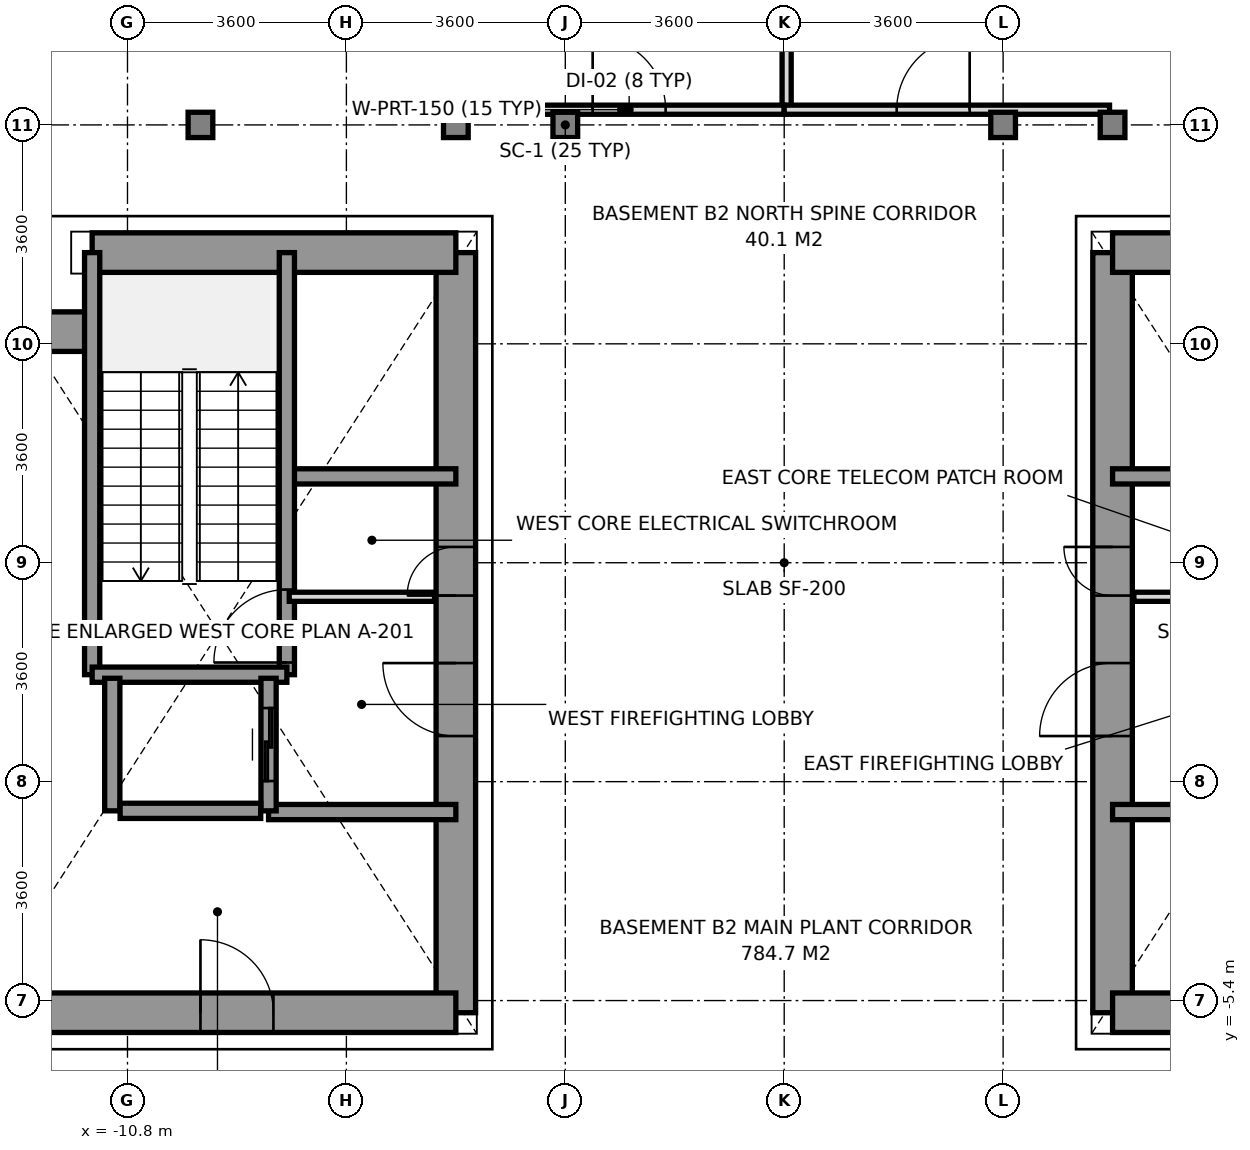
"""IFC4 building model, lengths in metres.
Left out: names, types, materials, properties, quantities, classifications, styles, units other than length and angle.
Written with IfcOpenShell. Run it as: python <this file> out.ifc"""

import sys

from ifc_helpers import new_model, si_unit, direction, frame, frame_2d, origin, origin_2d, place, context, subcontext, project, spatial, rectangle, i_section, extrude, source, transform, mapped, element, fill, save


model = new_model("IFC4")
c1 = context("Model", 3, precision=1e-05, world=origin(), true_north=direction((0.0, 1.0)))
c2 = subcontext(c1, "Body", "Model", "MODEL_VIEW")
j1 = project(units=[si_unit("LENGTHUNIT", "METRE"), si_unit("PLANEANGLEUNIT", "RADIAN")], contexts=[c1])
p1 = place(None, origin())
s1 = spatial("IfcSite", under=j1, at=p1, CompositionType="ELEMENT")
p2 = place(p1, origin())
s2 = spatial("IfcBuilding", under=s1, at=p2, CompositionType="ELEMENT")
p3 = place(p2, frame((0.0, 0.0, -8.4)))
s3 = spatial("IfcBuildingStorey", under=s2, at=p3, CompositionType="ELEMENT", Elevation=-8.4)
m1 = source(origin(), c2, "Body", "SweptSolid", [
    extrude(i_section(OverallWidth=0.406, OverallDepth=0.416, WebThickness=0.024, FlangeThickness=0.039, at=origin_2d()), origin(), (0.0, 0.0, 1.0), 4.12),
])
for number, where, z_axis, x_axis in (
    (1, (-9.6, 9.0, -0.2), (0.0, 0.0, 1.0), (1.0, 0.0, 0.0)),
    (2, (-5.4, 9.0, -0.2), (0.0, 0.0, 1.0), (1.0, 0.0, 0.0)),
    (3, (-3.6, 9.0, -0.2), (0.0, 0.0, 1.0), (1.0, 0.0, 0.0)),
    (4, (3.6, 9.0, -0.2), (0.0, 0.0, 1.0), (1.0, 0.0, 0.0)),
    (5, (5.4, 9.0, -0.2), (0.0, 0.0, 1.0), (1.0, 0.0, 0.0)),
):
    element("IfcColumn", number, at=place(p3, frame(where, z_axis=z_axis, x_axis=x_axis)), inside=s3, PredefinedType="COLUMN", context=c2, shape_type="MappedRepresentation", body=[
        mapped(m1, transform((0.0, 0.0, 0.0), x_axis=(1.0, 0.0, 0.0), y_axis=(0.0, 1.0, 0.0), z_axis=(0.0, 0.0, 1.0), scale=1.0)),
    ])
p4 = place(p3, frame((-5.4, -5.6, -0.2), z_axis=(0.0, 0.0, 1.0), x_axis=(0.0, 1.0, 0.0)))
e6 = element("IfcWall", 6, at=p4, inside=s3, PredefinedType="SHEAR", context=c2, shape_type="SweptSolid", body=[
    extrude(rectangle(XDim=12.5, YDim=0.65, at=frame_2d((6.25, 0.0))), origin(), (0.0, 0.0, 1.0), 4.12),
])
p5 = place(p4, frame((4.55, 0.0, 0.2)))
e7 = element("IfcOpeningElement", 7, at=p5, cuts=e6, PredefinedType="OPENING", context=c2, shape_type="SweptSolid", body=[
    extrude(rectangle(XDim=1.2, YDim=2.2, at=frame_2d((0.6, 1.1))), frame((0.0, 0.335, 0.0), z_axis=(0.0, -1.0, 0.0), x_axis=(1.0, 0.0, 0.0)), (0.0, 0.0, 1.0), 0.67),
])
p6 = place(p4, frame((6.86, 0.0, 0.2)))
e8 = element("IfcOpeningElement", 8, at=p6, cuts=e6, PredefinedType="OPENING", context=c2, shape_type="SweptSolid", body=[
    extrude(rectangle(XDim=0.8, YDim=2.1, at=frame_2d((0.4, 1.05))), frame((0.0, 0.335, 0.0), z_axis=(0.0, -1.0, 0.0), x_axis=(1.0, 0.0, 0.0)), (0.0, 0.0, 1.0), 0.67),
])
p7 = place(p3, frame((-11.381, 6.9, -0.2), z_axis=(0.0, 0.0, 1.0), x_axis=(1.0, 0.0, 0.0)))
e9 = element("IfcWall", 9, at=p7, inside=s3, PredefinedType="SHEAR", context=c2, shape_type="SweptSolid", body=[
    extrude(rectangle(XDim=5.981, YDim=0.65, at=frame_2d((2.991, 0.0))), origin(), (0.0, 0.0, 1.0), 4.12),
])
p8 = place(p3, frame((-13.2, 5.6, -0.2), z_axis=(0.0, 0.0, 1.0), x_axis=(1.0, 0.0, 0.0)))
e10 = element("IfcWall", 10, at=p8, inside=s3, PredefinedType="SHEAR", context=c2, shape_type="SweptSolid", body=[
    extrude(rectangle(XDim=1.819, YDim=0.65, at=frame_2d((0.909, 0.0))), origin(), (0.0, 0.0, 1.0), 4.12),
])
p9 = place(p3, frame((-13.2, -5.6, -0.2), z_axis=(0.0, 0.0, 1.0), x_axis=(1.0, 0.0, 0.0)))
e11 = element("IfcWall", 11, at=p9, inside=s3, PredefinedType="SHEAR", context=c2, shape_type="SweptSolid", body=[
    extrude(rectangle(XDim=7.8, YDim=0.65, at=frame_2d((3.9, 0.0))), origin(), (0.0, 0.0, 1.0), 4.12),
])
p10 = place(p9, frame((3.6, 0.0, 0.2)))
e12 = element("IfcOpeningElement", 12, at=p10, cuts=e11, PredefinedType="OPENING", context=c2, shape_type="SweptSolid", body=[
    extrude(rectangle(XDim=1.2, YDim=2.2, at=frame_2d((0.6, 1.1))), frame((0.0, 0.335, 0.0), z_axis=(0.0, -1.0, 0.0), x_axis=(1.0, 0.0, 0.0)), (0.0, 0.0, 1.0), 0.67),
])
p11 = place(p3, frame((-8.18, 3.22, -0.2), z_axis=(0.0, 0.0, 1.0), x_axis=(1.0, 0.0, 0.0)))
e13 = element("IfcWall", 13, at=p11, inside=s3, PredefinedType="SOLIDWALL", context=c2, shape_type="SweptSolid", body=[
    extrude(rectangle(XDim=2.78, YDim=0.25, at=frame_2d((1.39, 0.0))), origin(), (0.0, 0.0, 1.0), 4.12),
])
p12 = place(p3, frame((-8.48, -2.3, -0.2), z_axis=(0.0, 0.0, 1.0), x_axis=(1.0, 0.0, 0.0)))
e14 = element("IfcWall", 14, at=p12, inside=s3, PredefinedType="SOLIDWALL", context=c2, shape_type="SweptSolid", body=[
    extrude(rectangle(XDim=3.08, YDim=0.25, at=frame_2d((1.54, 0.0))), origin(), (0.0, 0.0, 1.0), 4.12),
])
p13 = place(p3, frame((-8.179, -0.041, -0.2), z_axis=(0.0, 0.0, 1.0), x_axis=(0.0, 1.0, 0.0)))
e15 = element("IfcWall", 15, at=p13, inside=s3, PredefinedType="SOLIDWALL", context=c2, shape_type="SweptSolid", body=[
    extrude(rectangle(XDim=6.941, YDim=0.25, at=frame_2d((3.47, 0.0))), origin(), (0.0, 0.0, 1.0), 4.12),
])
p14 = place(p13, frame((0.2, 0.0, 0.2)))
e16 = element("IfcOpeningElement", 16, at=p14, cuts=e15, PredefinedType="OPENING", context=c2, shape_type="SweptSolid", body=[
    extrude(rectangle(XDim=1.2, YDim=2.2, at=frame_2d((0.6, 1.1))), frame((0.0, 0.135, 0.0), z_axis=(0.0, -1.0, 0.0), x_axis=(1.0, 0.0, 0.0)), (0.0, 0.0, 1.0), 0.27),
])
p15 = place(p3, frame((-11.381, -0.041, -0.2), z_axis=(0.0, 0.0, 1.0), x_axis=(0.0, 1.0, 0.0)))
e17 = element("IfcWall", 17, at=p15, inside=s3, PredefinedType="SOLIDWALL", context=c2, shape_type="SweptSolid", body=[
    extrude(rectangle(XDim=6.941, YDim=0.25, at=frame_2d((3.47, 0.0))), origin(), (0.0, 0.0, 1.0), 4.12),
])
p16 = place(p3, frame((-11.381, -0.041, -0.2), z_axis=(0.0, 0.0, 1.0), x_axis=(1.0, 0.0, 0.0)))
e18 = element("IfcWall", 18, at=p16, inside=s3, PredefinedType="SOLIDWALL", context=c2, shape_type="SweptSolid", body=[
    extrude(rectangle(XDim=3.202, YDim=0.25, at=frame_2d((1.601, 0.0))), origin(), (0.0, 0.0, 1.0), 4.12),
])
p17 = place(p3, frame((5.4, -5.6, -0.2), z_axis=(0.0, 0.0, 1.0), x_axis=(0.0, 1.0, 0.0)))
e19 = element("IfcWall", 19, at=p17, inside=s3, PredefinedType="SHEAR", context=c2, shape_type="SweptSolid", body=[
    extrude(rectangle(XDim=12.5, YDim=0.65, at=frame_2d((6.25, 0.0))), origin(), (0.0, 0.0, 1.0), 4.12),
])
p18 = place(p17, frame((4.55, 0.0, 0.2)))
e20 = element("IfcOpeningElement", 20, at=p18, cuts=e19, PredefinedType="OPENING", context=c2, shape_type="SweptSolid", body=[
    extrude(rectangle(XDim=1.2, YDim=2.2, at=frame_2d((0.6, 1.1))), frame((0.0, 0.335, 0.0), z_axis=(0.0, -1.0, 0.0), x_axis=(1.0, 0.0, 0.0)), (0.0, 0.0, 1.0), 0.67),
])
p19 = place(p17, frame((6.86, 0.0, 0.2)))
e21 = element("IfcOpeningElement", 21, at=p19, cuts=e19, PredefinedType="OPENING", context=c2, shape_type="SweptSolid", body=[
    extrude(rectangle(XDim=0.8, YDim=2.1, at=frame_2d((0.4, 1.05))), frame((0.0, 0.335, 0.0), z_axis=(0.0, -1.0, 0.0), x_axis=(1.0, 0.0, 0.0)), (0.0, 0.0, 1.0), 0.67),
])
p20 = place(p3, frame((5.4, 6.9, -0.2), z_axis=(0.0, 0.0, 1.0), x_axis=(1.0, 0.0, 0.0)))
e22 = element("IfcWall", 22, at=p20, inside=s3, PredefinedType="SHEAR", context=c2, shape_type="SweptSolid", body=[
    extrude(rectangle(XDim=5.981, YDim=0.65, at=frame_2d((2.991, 0.0))), origin(), (0.0, 0.0, 1.0), 4.12),
])
p21 = place(p3, frame((5.4, -5.6, -0.2), z_axis=(0.0, 0.0, 1.0), x_axis=(1.0, 0.0, 0.0)))
e23 = element("IfcWall", 23, at=p21, inside=s3, PredefinedType="SHEAR", context=c2, shape_type="SweptSolid", body=[
    extrude(rectangle(XDim=7.8, YDim=0.65, at=frame_2d((3.9, 0.0))), origin(), (0.0, 0.0, 1.0), 4.12),
])
p22 = place(p21, frame((3.0, 0.0, 0.2)))
e24 = element("IfcOpeningElement", 24, at=p22, cuts=e23, PredefinedType="OPENING", context=c2, shape_type="SweptSolid", body=[
    extrude(rectangle(XDim=1.2, YDim=2.2, at=frame_2d((0.6, 1.1))), frame((0.0, 0.335, 0.0), z_axis=(0.0, -1.0, 0.0), x_axis=(1.0, 0.0, 0.0)), (0.0, 0.0, 1.0), 0.67),
])
p23 = place(p3, frame((5.4, 3.22, -0.2), z_axis=(0.0, 0.0, 1.0), x_axis=(1.0, 0.0, 0.0)))
e25 = element("IfcWall", 25, at=p23, inside=s3, PredefinedType="SOLIDWALL", context=c2, shape_type="SweptSolid", body=[
    extrude(rectangle(XDim=2.78, YDim=0.25, at=frame_2d((1.39, 0.0))), origin(), (0.0, 0.0, 1.0), 4.12),
])
p24 = place(p3, frame((5.4, -2.3, -0.2), z_axis=(0.0, 0.0, 1.0), x_axis=(1.0, 0.0, 0.0)))
e26 = element("IfcWall", 26, at=p24, inside=s3, PredefinedType="SOLIDWALL", context=c2, shape_type="SweptSolid", body=[
    extrude(rectangle(XDim=3.08, YDim=0.25, at=frame_2d((1.54, 0.0))), origin(), (0.0, 0.0, 1.0), 4.12),
])
p25 = place(p3, frame((-11.05, -2.28, -0.2), z_axis=(0.0, 0.0, 1.0), x_axis=(0.0, 1.0, 0.0)))
e27 = element("IfcWall", 27, at=p25, inside=s3, PredefinedType="SOLIDWALL", context=c2, shape_type="SweptSolid", body=[
    extrude(rectangle(XDim=2.18, YDim=0.25, at=frame_2d((1.09, 0.0))), origin(), (0.0, 0.0, 1.0), 4.12),
])
p26 = place(p3, frame((-8.48, -2.28, -0.2), z_axis=(0.0, 0.0, 1.0), x_axis=(0.0, 1.0, 0.0)))
e28 = element("IfcWall", 28, at=p26, inside=s3, PredefinedType="SOLIDWALL", context=c2, shape_type="SweptSolid", body=[
    extrude(rectangle(XDim=2.18, YDim=0.25, at=frame_2d((1.09, 0.0))), origin(), (0.0, 0.0, 1.0), 4.12),
])
p27 = place(p26, frame((0.49, 0.0, 0.2)))
e29 = element("IfcOpeningElement", 29, at=p27, cuts=e28, PredefinedType="OPENING", context=c2, shape_type="SweptSolid", body=[
    extrude(rectangle(XDim=1.2, YDim=2.2, at=frame_2d((0.6, 1.1))), frame((0.0, 0.135, 0.0), z_axis=(0.0, -1.0, 0.0), x_axis=(1.0, 0.0, 0.0)), (0.0, 0.0, 1.0), 0.27),
])
p28 = place(p3, frame((-10.921, -2.28, -0.2), z_axis=(0.0, 0.0, 1.0), x_axis=(1.0, 0.0, 0.0)))
e30 = element("IfcWall", 30, at=p28, inside=s3, PredefinedType="SOLIDWALL", context=c2, shape_type="SweptSolid", body=[
    extrude(rectangle(XDim=2.312, YDim=0.25, at=frame_2d((1.156, 0.0))), origin(), (0.0, 0.0, 1.0), 4.12),
])
for number, where, z_axis, x_axis in (
    (31, (-8.14, 1.24, 0.0), (0.0, 0.0, 1.0), (1.0, 0.0, 0.0)),
    (32, (5.75, 1.24, 0.0), (0.0, 0.0, 1.0), (1.0, 0.0, 0.0)),
):
    element("IfcWall", number, at=place(p3, frame(where, z_axis=z_axis, x_axis=x_axis)), inside=s3, PredefinedType="PARTITIONING", context=c2, shape_type="SweptSolid", body=[
        extrude(rectangle(XDim=2.39, YDim=0.15, at=frame_2d((1.195, 0.0))), origin(), (0.0, 0.0, 1.0), 3.02),
    ])
p29 = place(p3, frame((0.04, 9.25, 0.0), z_axis=(0.0, 0.0, 1.0), x_axis=(0.0, 1.0, 0.0)))
e33 = element("IfcWall", 33, at=p29, inside=s3, PredefinedType="PARTITIONING", context=c2, shape_type="SweptSolid", body=[
    extrude(rectangle(XDim=14.15, YDim=0.15, at=frame_2d((7.075, 0.0))), origin(), (0.0, 0.0, 1.0), 3.27),
])
p30 = place(p3, frame((-5.35, 9.25, 0.0), z_axis=(0.0, 0.0, 1.0), x_axis=(1.0, 0.0, 0.0)))
e34 = element("IfcWall", 34, at=p30, inside=s3, PredefinedType="PARTITIONING", context=c2, shape_type="SweptSolid", body=[
    extrude(rectangle(XDim=5.35, YDim=0.15, at=frame_2d((2.675, 0.0))), origin(), (0.0, 0.0, 1.0), 3.92),
])
p31 = place(p30, frame((2.2, 0.0, 0.0)))
e35 = element("IfcOpeningElement", 35, at=p31, cuts=e34, PredefinedType="OPENING", context=c2, shape_type="SweptSolid", body=[
    extrude(rectangle(XDim=1.2, YDim=2.2, at=frame_2d((0.6, 1.1))), frame((0.0, 0.085, 0.0), z_axis=(0.0, -1.0, 0.0), x_axis=(1.0, 0.0, 0.0)), (0.0, 0.0, 1.0), 0.17),
])
p32 = place(p3, frame((0.0, 9.25, 0.0), z_axis=(0.0, 0.0, 1.0), x_axis=(1.0, 0.0, 0.0)))
e36 = element("IfcWall", 36, at=p32, inside=s3, PredefinedType="PARTITIONING", context=c2, shape_type="SweptSolid", body=[
    extrude(rectangle(XDim=5.35, YDim=0.15, at=frame_2d((2.675, 0.0))), origin(), (0.0, 0.0, 1.0), 3.92),
])
p33 = place(p32, frame((1.85, 0.0, 0.0)))
e37 = element("IfcOpeningElement", 37, at=p33, cuts=e36, PredefinedType="OPENING", context=c2, shape_type="SweptSolid", body=[
    extrude(rectangle(XDim=1.2, YDim=2.2, at=frame_2d((0.6, 1.1))), frame((0.0, 0.085, 0.0), z_axis=(0.0, -1.0, 0.0), x_axis=(1.0, 0.0, 0.0)), (0.0, 0.0, 1.0), 0.17),
])
m2 = source(origin(), c2, "Body", "SweptSolid", [
    extrude(rectangle(XDim=1.2, YDim=2.2, at=frame_2d((0.6, 1.1))), frame((0.0, 0.025, 0.0), z_axis=(0.0, -1.0, 0.0), x_axis=(1.0, 0.0, 0.0)), (0.0, 0.0, 1.0), 0.05),
])
p34 = place(p14, origin())
e38 = element("IfcDoor", 38, at=p34, inside=s3, OperationType="SINGLE_SWING_LEFT", PredefinedType="DOOR", context=c2, shape_type="MappedRepresentation", body=[
    mapped(m2, transform((0.0, 0.0, 0.0), x_axis=(1.0, 0.0, 0.0), y_axis=(0.0, 1.0, 0.0), z_axis=(0.0, 0.0, 1.0), scale=1.0)),
])
fill(e16, e38)
p35 = place(p5, origin())
e39 = element("IfcDoor", 39, at=p35, inside=s3, OperationType="SINGLE_SWING_RIGHT", PredefinedType="DOOR", context=c2, shape_type="MappedRepresentation", body=[
    mapped(m2, transform((0.0, 0.0, 0.0), x_axis=(1.0, 0.0, 0.0), y_axis=(0.0, 1.0, 0.0), z_axis=(0.0, 0.0, 1.0), scale=1.0)),
])
fill(e7, e39)
p36 = place(p10, origin())
e40 = element("IfcDoor", 40, at=p36, inside=s3, OperationType="SINGLE_SWING_LEFT", PredefinedType="DOOR", context=c2, shape_type="MappedRepresentation", body=[
    mapped(m2, transform((0.0, 0.0, 0.0), x_axis=(1.0, 0.0, 0.0), y_axis=(0.0, 1.0, 0.0), z_axis=(0.0, 0.0, 1.0), scale=1.0)),
])
fill(e12, e40)
p37 = place(p18, origin())
e41 = element("IfcDoor", 41, at=p37, inside=s3, OperationType="SINGLE_SWING_LEFT", PredefinedType="DOOR", context=c2, shape_type="MappedRepresentation", body=[
    mapped(m2, transform((0.0, 0.0, 0.0), x_axis=(1.0, 0.0, 0.0), y_axis=(0.0, 1.0, 0.0), z_axis=(0.0, 0.0, 1.0), scale=1.0)),
])
fill(e20, e41)
m3 = source(origin(), c2, "Body", "SweptSolid", [
    extrude(rectangle(XDim=0.8, YDim=2.1, at=frame_2d((0.4, 1.05))), frame((0.0, 0.025, 0.0), z_axis=(0.0, -1.0, 0.0), x_axis=(1.0, 0.0, 0.0)), (0.0, 0.0, 1.0), 0.05),
])
p38 = place(p6, origin())
e42 = element("IfcDoor", 42, at=p38, inside=s3, OperationType="SINGLE_SWING_LEFT", PredefinedType="DOOR", context=c2, shape_type="MappedRepresentation", body=[
    mapped(m3, transform((0.0, 0.0, 0.0), x_axis=(1.0, 0.0, 0.0), y_axis=(0.0, 1.0, 0.0), z_axis=(0.0, 0.0, 1.0), scale=1.0)),
])
fill(e8, e42)
p39 = place(p19, origin())
e43 = element("IfcDoor", 43, at=p39, inside=s3, OperationType="SINGLE_SWING_RIGHT", PredefinedType="DOOR", context=c2, shape_type="MappedRepresentation", body=[
    mapped(m3, transform((0.0, 0.0, 0.0), x_axis=(1.0, 0.0, 0.0), y_axis=(0.0, 1.0, 0.0), z_axis=(0.0, 0.0, 1.0), scale=1.0)),
])
fill(e21, e43)
p40 = place(p27, origin())
e44 = element("IfcDoor", 44, at=p40, inside=s3, OperationType="SLIDING_TO_RIGHT", PredefinedType="DOOR", context=c2, shape_type="MappedRepresentation", body=[
    mapped(m2, transform((0.0, 0.0, 0.0), x_axis=(1.0, 0.0, 0.0), y_axis=(0.0, 1.0, 0.0), z_axis=(0.0, 0.0, 1.0), scale=1.0)),
])
fill(e29, e44)
p41 = place(p31, origin())
e45 = element("IfcDoor", 45, at=p41, inside=s3, OperationType="SINGLE_SWING_LEFT", PredefinedType="DOOR", context=c2, shape_type="MappedRepresentation", body=[
    mapped(m2, transform((0.0, 0.0, 0.0), x_axis=(1.0, 0.0, 0.0), y_axis=(0.0, 1.0, 0.0), z_axis=(0.0, 0.0, 1.0), scale=1.0)),
])
fill(e35, e45)
p42 = place(p33, origin())
e46 = element("IfcDoor", 46, at=p42, inside=s3, OperationType="SINGLE_SWING_RIGHT", PredefinedType="DOOR", context=c2, shape_type="MappedRepresentation", body=[
    mapped(m2, transform((0.0, 0.0, 0.0), x_axis=(1.0, 0.0, 0.0), y_axis=(0.0, 1.0, 0.0), z_axis=(0.0, 0.0, 1.0), scale=1.0)),
])
fill(e37, e46)
save(model, sys.argv[1])
